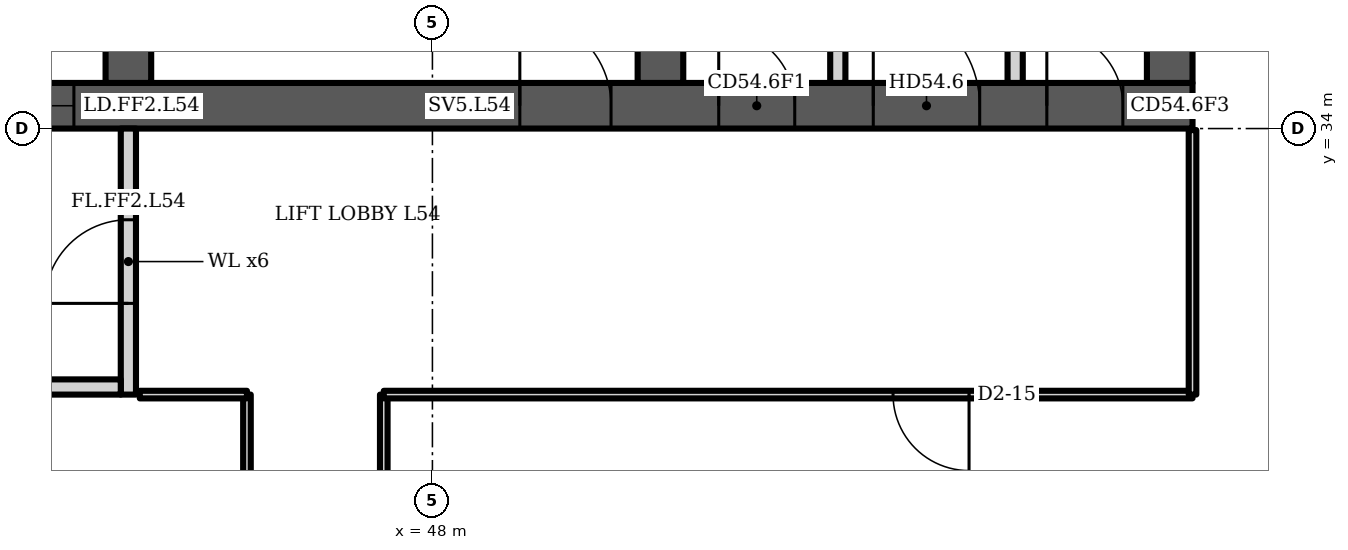
"""IFC4 building model, lengths in metres.
Left out: names, types, materials, properties, quantities, classifications, styles, units other than length and angle.
Written with IfcOpenShell. Run it as: python <this file> out.ifc"""

import sys

from ifc_helpers import new_model, si_unit, direction, frame, frame_2d, origin, place, context, subcontext, project, spatial, polyline, rectangle, outline, extrude, element, fill, save


model = new_model("IFC4")
c1 = context("Model", 3, precision=1e-05, world=origin(), true_north=direction((0.0, 1.0)))
c2 = subcontext(c1, "Body", "Model", "MODEL_VIEW")
j1 = project(units=[si_unit("LENGTHUNIT", "METRE"), si_unit("PLANEANGLEUNIT", "RADIAN")], contexts=[c1])
p1 = place(None, origin())
s1 = spatial("IfcSite", under=j1, at=p1, CompositionType="ELEMENT")
p2 = place(p1, origin())
s2 = spatial("IfcBuilding", under=s1, at=p2, CompositionType="ELEMENT")
p3 = place(p2, frame((0.0, 0.0, 217.9)))
s3 = spatial("IfcBuildingStorey", under=s2, at=p3, CompositionType="ELEMENT", Elevation=217.9)
p4 = place(p3, frame((23.0, 34.3, 0.0), z_axis=(0.0, 0.0, 1.0), x_axis=(1.0, 0.0, 0.0)))
e1 = element("IfcWall", 1, at=p4, inside=s3, PredefinedType="SHEAR", context=c2, shape_type="SweptSolid", body=[
    extrude(rectangle(XDim=35.0, YDim=0.6, at=frame_2d((17.5, 0.0))), origin(), (0.0, 0.0, 1.0), 3.6),
])
p5 = place(p4, frame((0.65, 0.0, 0.0)))
e2 = element("IfcOpeningElement", 2, at=p5, cuts=e1, PredefinedType="OPENING", context=c2, shape_type="SweptSolid", body=[
    extrude(rectangle(XDim=1.2, YDim=2.1, at=frame_2d((0.6, 1.05))), frame((0.0, 0.31, 0.0), z_axis=(0.0, -1.0, 0.0), x_axis=(1.0, 0.0, 0.0)), (0.0, 0.0, 1.0), 0.62),
])
p6 = place(p4, frame((7.717, 0.0, 0.0)))
e3 = element("IfcOpeningElement", 3, at=p6, cuts=e1, PredefinedType="OPENING", context=c2, shape_type="SweptSolid", body=[
    extrude(rectangle(XDim=1.1, YDim=2.1, at=frame_2d((0.55, 1.05))), frame((0.0, 0.31, 0.0), z_axis=(0.0, -1.0, 0.0), x_axis=(1.0, 0.0, 0.0)), (0.0, 0.0, 1.0), 0.62),
])
p7 = place(p4, frame((12.183, 0.0, 0.0)))
e4 = element("IfcOpeningElement", 4, at=p7, cuts=e1, PredefinedType="OPENING", context=c2, shape_type="SweptSolid", body=[
    extrude(rectangle(XDim=1.1, YDim=2.1, at=frame_2d((0.55, 1.05))), frame((0.0, 0.31, 0.0), z_axis=(0.0, -1.0, 0.0), x_axis=(1.0, 0.0, 0.0)), (0.0, 0.0, 1.0), 0.62),
])
p8 = place(p4, frame((9.8, 0.0, 0.0)))
e5 = element("IfcOpeningElement", 5, at=p8, cuts=e1, PredefinedType="OPENING", context=c2, shape_type="SweptSolid", body=[
    extrude(rectangle(XDim=1.4, YDim=2.1, at=frame_2d((0.7, 1.05))), frame((0.0, 0.31, 0.0), z_axis=(0.0, -1.0, 0.0), x_axis=(1.0, 0.0, 0.0)), (0.0, 0.0, 1.0), 0.62),
])
p9 = place(p4, frame((14.717, 0.0, 0.0)))
e6 = element("IfcOpeningElement", 6, at=p9, cuts=e1, PredefinedType="OPENING", context=c2, shape_type="SweptSolid", body=[
    extrude(rectangle(XDim=1.1, YDim=2.1, at=frame_2d((0.55, 1.05))), frame((0.0, 0.31, 0.0), z_axis=(0.0, -1.0, 0.0), x_axis=(1.0, 0.0, 0.0)), (0.0, 0.0, 1.0), 0.62),
])
p10 = place(p4, frame((16.95, 0.0, 0.0)))
e7 = element("IfcOpeningElement", 7, at=p10, cuts=e1, PredefinedType="OPENING", context=c2, shape_type="SweptSolid", body=[
    extrude(rectangle(XDim=1.1, YDim=2.1, at=frame_2d((0.55, 1.05))), frame((0.0, 0.31, 0.0), z_axis=(0.0, -1.0, 0.0), x_axis=(1.0, 0.0, 0.0)), (0.0, 0.0, 1.0), 0.62),
])
p11 = place(p4, frame((19.183, 0.0, 0.0)))
e8 = element("IfcOpeningElement", 8, at=p11, cuts=e1, PredefinedType="OPENING", context=c2, shape_type="SweptSolid", body=[
    extrude(rectangle(XDim=1.1, YDim=2.1, at=frame_2d((0.55, 1.05))), frame((0.0, 0.31, 0.0), z_axis=(0.0, -1.0, 0.0), x_axis=(1.0, 0.0, 0.0)), (0.0, 0.0, 1.0), 0.62),
])
p12 = place(p4, frame((26.15, 0.0, 0.0)))
e9 = element("IfcOpeningElement", 9, at=p12, cuts=e1, PredefinedType="OPENING", context=c2, shape_type="SweptSolid", body=[
    extrude(rectangle(XDim=1.2, YDim=2.1, at=frame_2d((0.6, 1.05))), frame((0.0, 0.31, 0.0), z_axis=(0.0, -1.0, 0.0), x_axis=(1.0, 0.0, 0.0)), (0.0, 0.0, 1.0), 0.62),
])
p13 = place(p4, frame((28.767, 0.0, 0.0)))
e10 = element("IfcOpeningElement", 10, at=p13, cuts=e1, PredefinedType="OPENING", context=c2, shape_type="SweptSolid", body=[
    extrude(rectangle(XDim=1.0, YDim=2.1, at=frame_2d((0.5, 1.05))), frame((0.0, 0.31, 0.0), z_axis=(0.0, -1.0, 0.0), x_axis=(1.0, 0.0, 0.0)), (0.0, 0.0, 1.0), 0.62),
])
p14 = place(p4, frame((33.083, 0.0, 0.0)))
e11 = element("IfcOpeningElement", 11, at=p14, cuts=e1, PredefinedType="OPENING", context=c2, shape_type="SweptSolid", body=[
    extrude(rectangle(XDim=1.0, YDim=2.1, at=frame_2d((0.5, 1.05))), frame((0.0, 0.31, 0.0), z_axis=(0.0, -1.0, 0.0), x_axis=(1.0, 0.0, 0.0)), (0.0, 0.0, 1.0), 0.62),
])
p15 = place(p4, frame((30.8, 0.0, 0.0)))
e12 = element("IfcOpeningElement", 12, at=p15, cuts=e1, PredefinedType="OPENING", context=c2, shape_type="SweptSolid", body=[
    extrude(rectangle(XDim=1.4, YDim=2.1, at=frame_2d((0.7, 1.05))), frame((0.0, 0.31, 0.0), z_axis=(0.0, -1.0, 0.0), x_axis=(1.0, 0.0, 0.0)), (0.0, 0.0, 1.0), 0.62),
])
p16 = place(p3, frame((44.0, 34.6, 0.0), z_axis=(0.0, 0.0, 1.0), x_axis=(0.0, 1.0, 0.0)))
e13 = element("IfcWall", 13, at=p16, inside=s3, PredefinedType="SHEAR", context=c2, shape_type="SweptSolid", body=[
    extrude(rectangle(XDim=14.784, YDim=0.6, at=frame_2d((7.392, 0.0))), origin(), (0.0, 0.0, 1.0), 3.6),
])
p17 = place(p16, frame((11.608, 0.0, 0.0)))
e14 = element("IfcOpeningElement", 14, at=p17, cuts=e13, PredefinedType="OPENING", context=c2, shape_type="SweptSolid", body=[
    extrude(rectangle(XDim=1.0, YDim=2.1, at=frame_2d((0.5, 1.05))), frame((0.0, 0.31, 0.0), z_axis=(0.0, -1.0, 0.0), x_axis=(1.0, 0.0, 0.0)), (0.0, 0.0, 1.0), 0.62),
])
p18 = place(p16, frame((3.8, 0.0, 0.0)))
e15 = element("IfcOpeningElement", 15, at=p18, cuts=e13, PredefinedType="OPENING", context=c2, shape_type="SweptSolid", body=[
    extrude(rectangle(XDim=1.1, YDim=2.1, at=frame_2d((0.55, 1.05))), frame((0.0, 0.31, 0.0), z_axis=(0.0, -1.0, 0.0), x_axis=(1.0, 0.0, 0.0)), (0.0, 0.0, 1.0), 0.62),
])
p19 = place(p3, frame((51.0, 34.6, 0.0), z_axis=(0.0, 0.0, 1.0), x_axis=(0.0, 1.0, 0.0)))
e16 = element("IfcWall", 16, at=p19, inside=s3, PredefinedType="SHEAR", context=c2, shape_type="SweptSolid", body=[
    extrude(rectangle(XDim=14.171, YDim=0.6, at=frame_2d((7.085, 0.0))), origin(), (0.0, 0.0, 1.0), 3.6),
])
p20 = place(p19, frame((3.8, 0.0, 0.0)))
e17 = element("IfcOpeningElement", 17, at=p20, cuts=e16, PredefinedType="OPENING", context=c2, shape_type="SweptSolid", body=[
    extrude(rectangle(XDim=1.1, YDim=2.1, at=frame_2d((0.55, 1.05))), frame((0.0, 0.31, 0.0), z_axis=(0.0, -1.0, 0.0), x_axis=(1.0, 0.0, 0.0)), (0.0, 0.0, 1.0), 0.62),
])
p21 = place(p3, frame((57.7, 34.6, 0.0), z_axis=(0.0, 0.0, 1.0), x_axis=(0.0, 1.0, 0.0)))
e18 = element("IfcWall", 18, at=p21, inside=s3, PredefinedType="SHEAR", context=c2, shape_type="SweptSolid", body=[
    extrude(rectangle(XDim=13.585, YDim=0.6, at=frame_2d((6.792, 0.0))), origin(), (0.0, 0.0, 1.0), 3.6),
])
p22 = place(p3, origin())
e19 = element("IfcWall", 19, at=p22, inside=s3, PredefinedType="PARTITIONING", context=c2, shape_type="SweptSolid", body=[
    extrude(outline(polyline([(41.567, 37.1), (39.433, 37.1), (39.433, 34.6), (39.233, 34.6), (39.233, 37.45), (37.3, 37.45), (37.3, 37.65), (39.233, 37.65), (39.433, 37.65), (39.433, 37.3), (41.567, 37.3), (41.567, 37.35), (41.767, 37.35), (43.7, 37.35), (43.7, 37.15), (41.767, 37.15), (41.767, 34.6), (41.567, 34.6), (41.567, 37.1)])), origin(), (0.0, 0.0, 1.0), 3.2),
])
p23 = place(p3, origin())
e20 = element("IfcWall", 20, at=p23, inside=s3, PredefinedType="PARTITIONING", context=c2, shape_type="SweptSolid", body=[
    extrude(outline(polyline([(53.233, 34.6), (53.233, 37.3), (53.433, 37.3), (53.433, 34.6), (53.233, 34.6)])), origin(), (0.0, 0.0, 1.0), 3.2),
])
p24 = place(p3, origin())
e21 = element("IfcWall", 21, at=p24, inside=s3, PredefinedType="PARTITIONING", context=c2, shape_type="SweptSolid", body=[
    extrude(outline(polyline([(55.567, 34.6), (55.567, 37.3), (55.767, 37.3), (55.767, 34.6), (55.567, 34.6)])), origin(), (0.0, 0.0, 1.0), 3.2),
])
p25 = place(p3, frame((44.0, 30.5, 0.0), z_axis=(0.0, 0.0, 1.0), x_axis=(0.0, 1.0, 0.0)))
e22 = element("IfcWall", 22, at=p25, inside=s3, PredefinedType="PARTITIONING", context=c2, shape_type="SweptSolid", body=[
    extrude(rectangle(XDim=3.5, YDim=0.2, at=frame_2d((1.75, 0.0))), origin(), (0.0, 0.0, 1.0), 3.2),
])
p26 = place(p25, frame((1.2, 0.0, 0.0)))
e23 = element("IfcOpeningElement", 23, at=p26, cuts=e22, PredefinedType="OPENING", context=c2, shape_type="SweptSolid", body=[
    extrude(rectangle(XDim=1.1, YDim=2.1, at=frame_2d((0.55, 1.05))), frame((0.0, 0.11, 0.0), z_axis=(0.0, -1.0, 0.0), x_axis=(1.0, 0.0, 0.0)), (0.0, 0.0, 1.0), 0.22),
])
p27 = place(p3, frame((41.1, 30.6, 0.0), z_axis=(0.0, 0.0, 1.0), x_axis=(1.0, 0.0, 0.0)))
e24 = element("IfcWall", 24, at=p27, inside=s3, PredefinedType="PARTITIONING", context=c2, shape_type="SweptSolid", body=[
    extrude(rectangle(XDim=2.8, YDim=0.2, at=frame_2d((1.4, 0.0))), origin(), (0.0, 0.0, 1.0), 3.2),
])
p28 = place(p3, frame((45.56, 19.2, 0.0), z_axis=(0.0, 0.0, 1.0), x_axis=(0.0, 1.0, 0.0)))
e25 = element("IfcWall", 25, at=p28, inside=s3, PredefinedType="PARTITIONING", context=c2, shape_type="SweptSolid", body=[
    extrude(rectangle(XDim=11.3, YDim=0.1, at=frame_2d((5.65, 0.0))), origin(), (0.0, 0.0, 1.0), 3.2),
])
p29 = place(p28, frame((5.94, 0.0, 0.0)))
e26 = element("IfcOpeningElement", 26, at=p29, cuts=e25, PredefinedType="OPENING", context=c2, shape_type="SweptSolid", body=[
    extrude(rectangle(XDim=1.0, YDim=2.1, at=frame_2d((0.5, 1.05))), frame((0.0, 0.06, 0.0), z_axis=(0.0, -1.0, 0.0), x_axis=(1.0, 0.0, 0.0)), (0.0, 0.0, 1.0), 0.12),
])
p30 = place(p3, frame((47.36, 19.2, 0.0), z_axis=(0.0, 0.0, 1.0), x_axis=(0.0, 1.0, 0.0)))
e27 = element("IfcWall", 27, at=p30, inside=s3, PredefinedType="PARTITIONING", context=c2, shape_type="SweptSolid", body=[
    extrude(rectangle(XDim=11.3, YDim=0.1, at=frame_2d((5.65, 0.0))), origin(), (0.0, 0.0, 1.0), 3.2),
])
p31 = place(p3, frame((47.36, 30.5, 0.0), z_axis=(0.0, 0.0, 1.0), x_axis=(1.0, 0.0, 0.0)))
e28 = element("IfcWall", 28, at=p31, inside=s3, PredefinedType="PARTITIONING", context=c2, shape_type="SweptSolid", body=[
    extrude(rectangle(XDim=10.64, YDim=0.1, at=frame_2d((5.32, 0.0))), origin(), (0.0, 0.0, 1.0), 3.2),
])
p32 = place(p31, frame((6.7, 0.0, 0.0)))
e29 = element("IfcOpeningElement", 29, at=p32, cuts=e28, PredefinedType="OPENING", context=c2, shape_type="SweptSolid", body=[
    extrude(rectangle(XDim=1.0, YDim=2.1, at=frame_2d((0.5, 1.05))), frame((0.0, 0.06, 0.0), z_axis=(0.0, -1.0, 0.0), x_axis=(1.0, 0.0, 0.0)), (0.0, 0.0, 1.0), 0.12),
])
p33 = place(p3, frame((58.0, 30.5, 0.0), z_axis=(0.0, 0.0, 1.0), x_axis=(0.0, 1.0, 0.0)))
e30 = element("IfcWall", 30, at=p33, inside=s3, PredefinedType="PARTITIONING", context=c2, shape_type="SweptSolid", body=[
    extrude(rectangle(XDim=3.48, YDim=0.1, at=frame_2d((1.74, 0.0))), origin(), (0.0, 0.0, 1.0), 3.2),
])
p34 = place(p3, frame((44.15, 30.5, 0.0), z_axis=(0.0, 0.0, 1.0), x_axis=(1.0, 0.0, 0.0)))
e31 = element("IfcWall", 31, at=p34, inside=s3, PredefinedType="PARTITIONING", context=c2, shape_type="SweptSolid", body=[
    extrude(rectangle(XDim=1.41, YDim=0.1, at=frame_2d((0.705, 0.0))), origin(), (0.0, 0.0, 1.0), 3.2),
])
p35 = place(p11, origin())
e32 = element("IfcDoor", 32, at=p35, inside=s3, OperationType="DOUBLE_DOOR_SLIDING", PredefinedType="DOOR", context=c2, shape_type="SweptSolid", body=[
    extrude(rectangle(XDim=1.1, YDim=2.1, at=frame_2d((0.55, 1.05))), frame((0.0, 0.025, 0.0), z_axis=(0.0, -1.0, 0.0), x_axis=(1.0, 0.0, 0.0)), (0.0, 0.0, 1.0), 0.05),
])
fill(e8, e32)
p36 = place(p12, origin())
e33 = element("IfcDoor", 33, at=p36, inside=s3, OperationType="SINGLE_SWING_LEFT", PredefinedType="DOOR", context=c2, shape_type="SweptSolid", body=[
    extrude(rectangle(XDim=1.2, YDim=2.1, at=frame_2d((0.6, 1.05))), frame((0.0, 0.025, 0.0), z_axis=(0.0, -1.0, 0.0), x_axis=(1.0, 0.0, 0.0)), (0.0, 0.0, 1.0), 0.05),
])
fill(e9, e33)
p37 = place(p13, origin())
e34 = element("IfcDoor", 34, at=p37, inside=s3, OperationType="SINGLE_SWING_LEFT", PredefinedType="DOOR", context=c2, shape_type="SweptSolid", body=[
    extrude(rectangle(XDim=1.0, YDim=2.1, at=frame_2d((0.5, 1.05))), frame((0.0, 0.025, 0.0), z_axis=(0.0, -1.0, 0.0), x_axis=(1.0, 0.0, 0.0)), (0.0, 0.0, 1.0), 0.05),
])
fill(e10, e34)
p38 = place(p14, origin())
e35 = element("IfcDoor", 35, at=p38, inside=s3, OperationType="SINGLE_SWING_LEFT", PredefinedType="DOOR", context=c2, shape_type="SweptSolid", body=[
    extrude(rectangle(XDim=1.0, YDim=2.1, at=frame_2d((0.5, 1.05))), frame((0.0, 0.025, 0.0), z_axis=(0.0, -1.0, 0.0), x_axis=(1.0, 0.0, 0.0)), (0.0, 0.0, 1.0), 0.05),
])
fill(e11, e35)
p39 = place(p15, origin())
e36 = element("IfcDoor", 36, at=p39, inside=s3, OperationType="DOUBLE_DOOR_SINGLE_SWING", PredefinedType="DOOR", context=c2, shape_type="SweptSolid", body=[
    extrude(rectangle(XDim=1.4, YDim=2.1, at=frame_2d((0.7, 1.05))), frame((0.0, 0.025, 0.0), z_axis=(0.0, -1.0, 0.0), x_axis=(1.0, 0.0, 0.0)), (0.0, 0.0, 1.0), 0.05),
])
fill(e12, e36)
p40 = place(p26, origin())
e37 = element("IfcDoor", 37, at=p40, inside=s3, OperationType="SINGLE_SWING_LEFT", PredefinedType="DOOR", context=c2, shape_type="SweptSolid", body=[
    extrude(rectangle(XDim=1.1, YDim=2.1, at=frame_2d((0.55, 1.05))), frame((0.0, 0.025, 0.0), z_axis=(0.0, -1.0, 0.0), x_axis=(1.0, 0.0, 0.0)), (0.0, 0.0, 1.0), 0.05),
])
fill(e23, e37)
p41 = place(p32, origin())
e38 = element("IfcDoor", 38, at=p41, inside=s3, OperationType="SINGLE_SWING_RIGHT", PredefinedType="DOOR", context=c2, shape_type="SweptSolid", body=[
    extrude(rectangle(XDim=1.0, YDim=2.1, at=frame_2d((0.5, 1.05))), frame((0.0, 0.025, 0.0), z_axis=(0.0, -1.0, 0.0), x_axis=(1.0, 0.0, 0.0)), (0.0, 0.0, 1.0), 0.05),
])
fill(e29, e38)
save(model, sys.argv[1])
